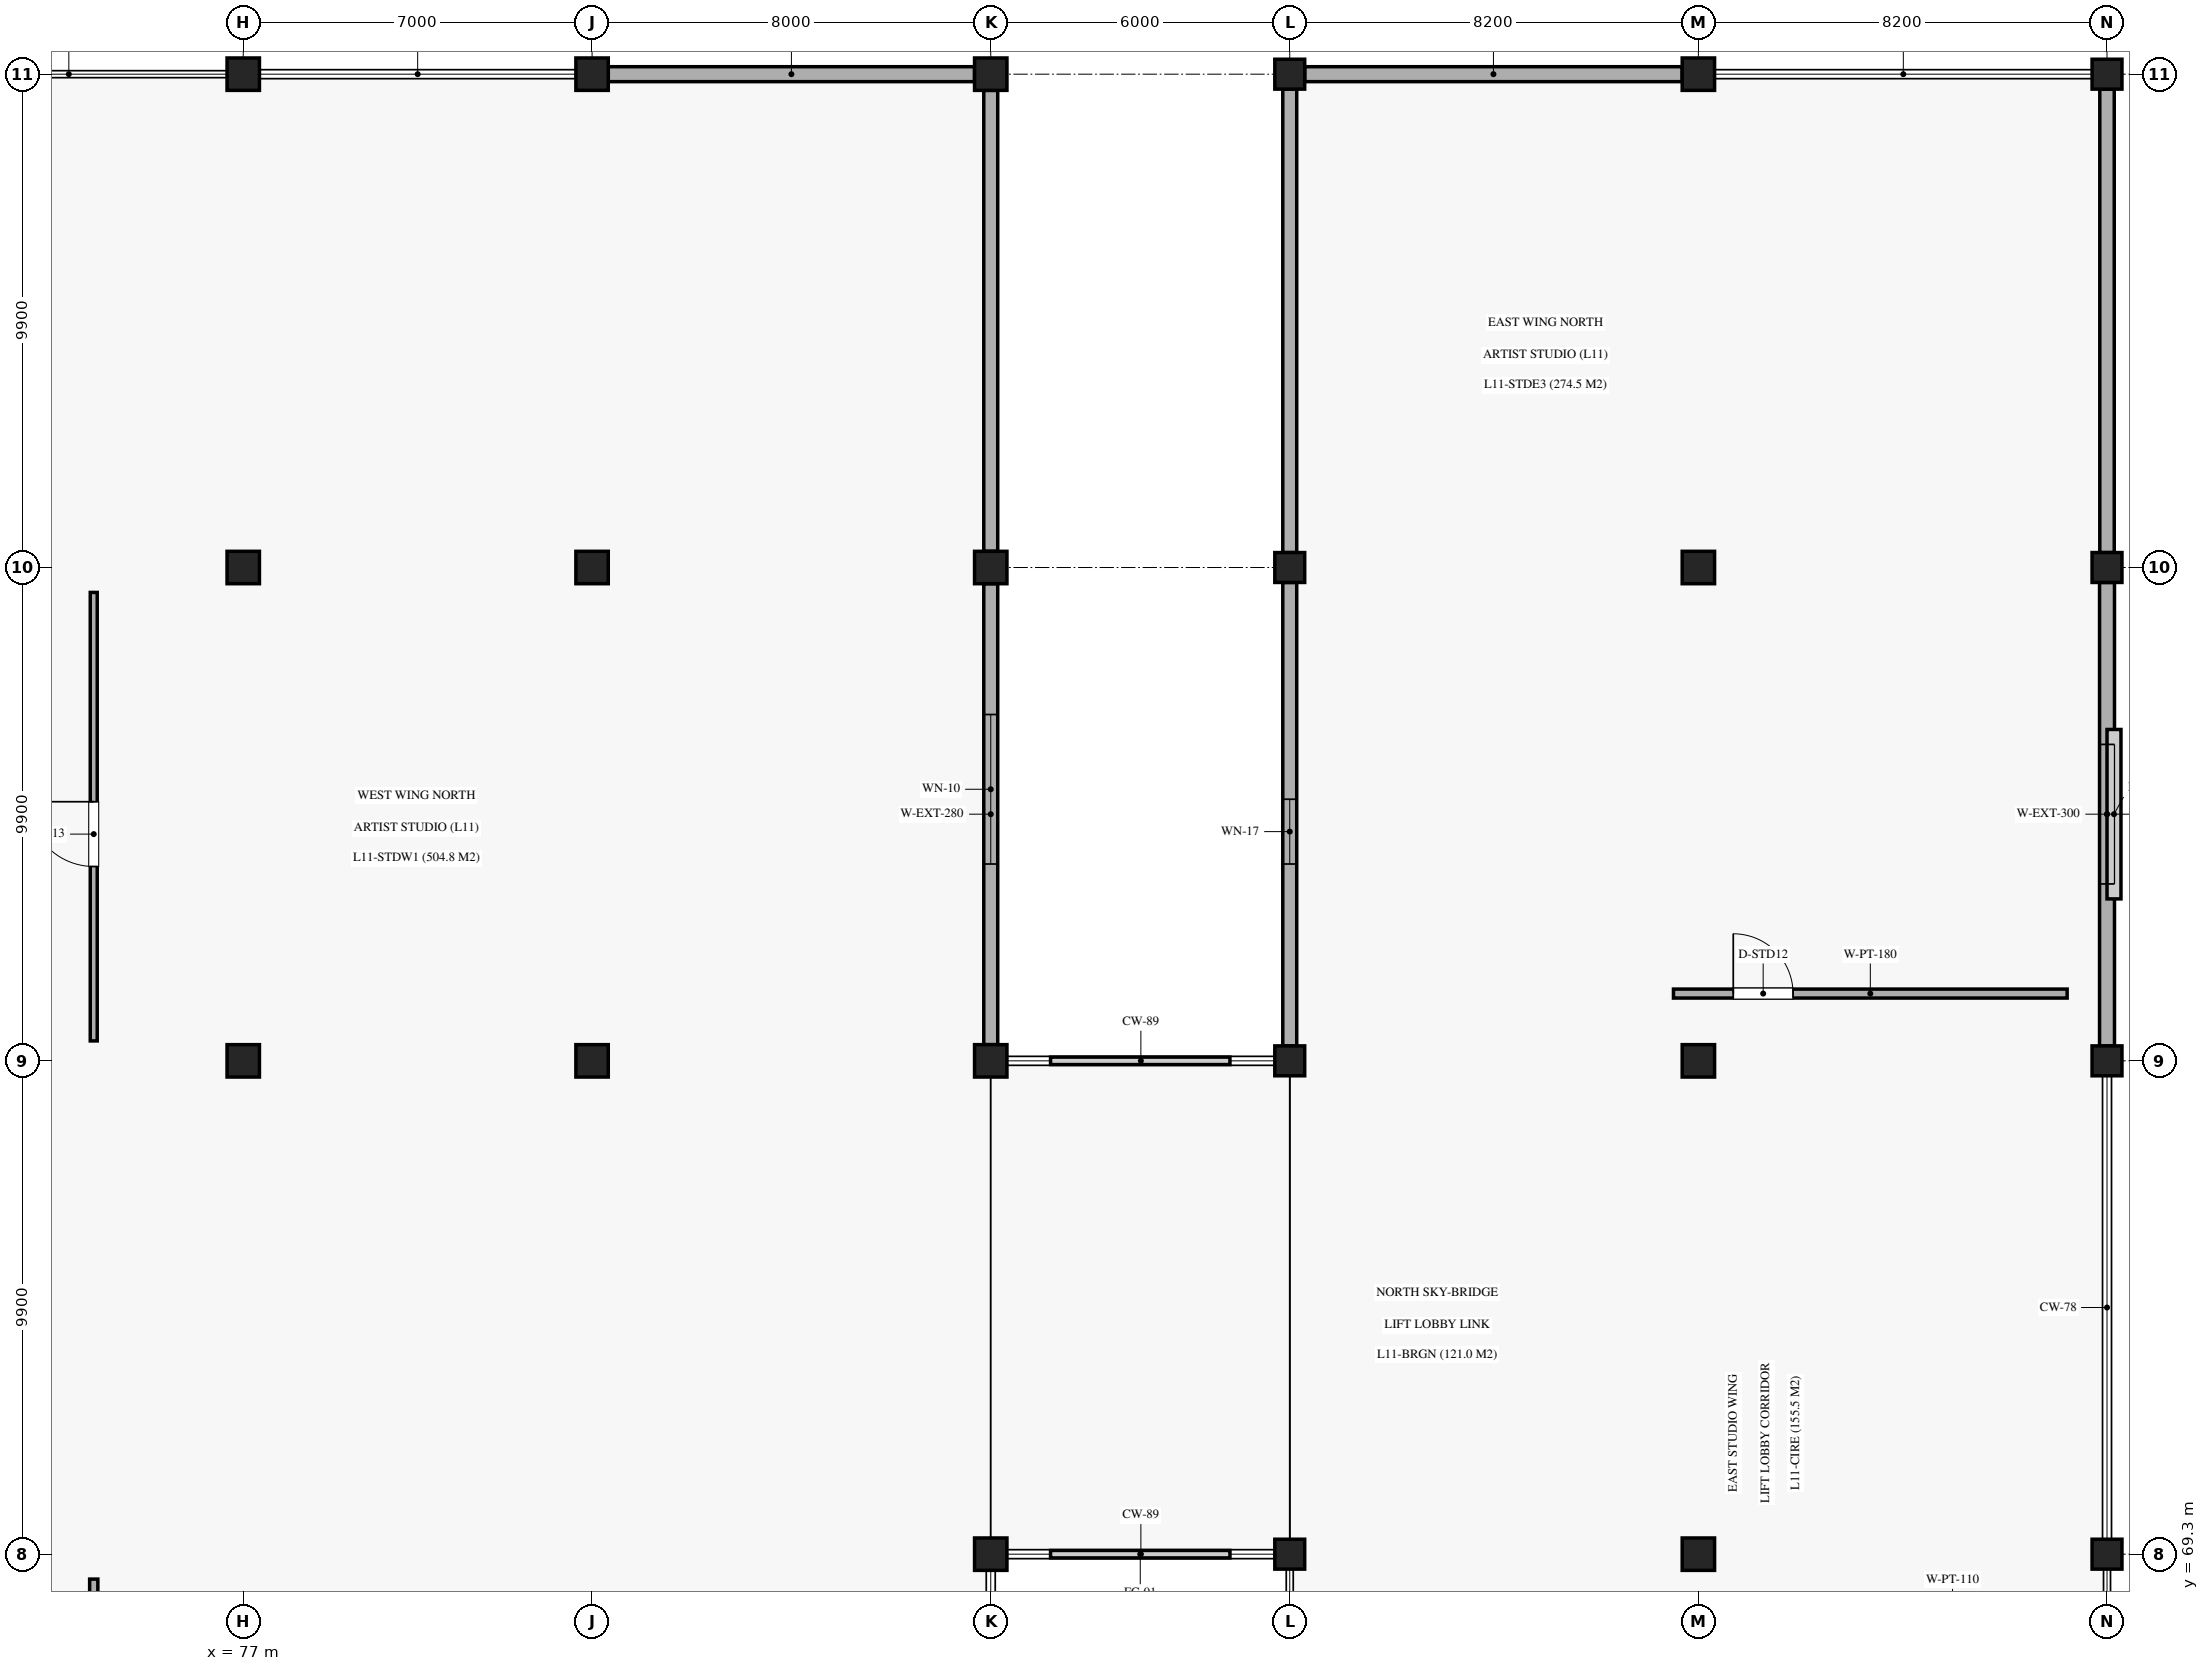
"""IFC4 building model, lengths in metres.
Left out: names, types, materials, properties, quantities, classifications, styles, units other than length and angle.
Written with IfcOpenShell. Run it as: python <this file> out.ifc"""

import sys

from ifc_helpers import new_model, si_unit, direction, frame, frame_2d, origin, origin_2d, place, context, subcontext, project, spatial, rectangle, extrude, element, fill, save


model = new_model("IFC4")
c1 = context("Model", 3, precision=1e-05, world=origin(), true_north=direction((0.0, 1.0)))
c2 = subcontext(c1, "Body", "Model", "MODEL_VIEW")
j1 = project(units=[si_unit("LENGTHUNIT", "METRE"), si_unit("PLANEANGLEUNIT", "RADIAN")], contexts=[c1])
p1 = place(None, origin())
s1 = spatial("IfcSite", under=j1, at=p1, CompositionType="ELEMENT")
p2 = place(p1, origin())
s2 = spatial("IfcBuilding", under=s1, at=p2, CompositionType="ELEMENT")
p3 = place(p2, frame((0.0, 0.0, 57.12)))
s3 = spatial("IfcBuildingStorey", under=s2, at=p3, CompositionType="ELEMENT", Elevation=57.12)
for number, where, z_axis, x_axis in (
    (1, (77.0, 79.2, 0.0), (0.0, 0.0, 1.0), (1.0, 0.0, 0.0)),
    (2, (77.0, 89.1, 0.0), (0.0, 0.0, 1.0), (1.0, 0.0, 0.0)),
    (3, (77.0, 99.0, 0.0), (0.0, 0.0, 1.0), (1.0, 0.0, 0.0)),
    (4, (84.0, 79.2, 0.0), (0.0, 0.0, 1.0), (1.0, 0.0, 0.0)),
    (5, (84.0, 89.1, 0.0), (0.0, 0.0, 1.0), (1.0, 0.0, 0.0)),
    (6, (84.0, 99.0, 0.0), (0.0, 0.0, 1.0), (1.0, 0.0, 0.0)),
    (7, (92.0, 69.3, 0.0), (0.0, 0.0, 1.0), (1.0, 0.0, 0.0)),
    (8, (92.0, 79.2, 0.0), (0.0, 0.0, 1.0), (1.0, 0.0, 0.0)),
    (9, (92.0, 89.1, 0.0), (0.0, 0.0, 1.0), (1.0, 0.0, 0.0)),
    (10, (92.0, 99.0, 0.0), (0.0, 0.0, 1.0), (1.0, 0.0, 0.0)),
):
    element("IfcColumn", number, at=place(p3, frame(where, z_axis=z_axis, x_axis=x_axis)), inside=s3, PredefinedType="COLUMN", context=c2, shape_type="SweptSolid", body=[
        extrude(rectangle(XDim=0.65, YDim=0.65, at=origin_2d()), origin(), (0.0, 0.0, 1.0), 5.1),
    ])
for number, where, z_axis, x_axis in (
    (11, (98.0, 69.3, 0.0), (0.0, 0.0, 1.0), (1.0, 0.0, 0.0)),
    (12, (98.0, 79.2, 0.0), (0.0, 0.0, 1.0), (1.0, 0.0, 0.0)),
    (13, (98.0, 89.1, 0.0), (0.0, 0.0, 1.0), (1.0, 0.0, 0.0)),
    (14, (98.0, 99.0, 0.0), (0.0, 0.0, 1.0), (1.0, 0.0, 0.0)),
):
    element("IfcColumn", number, at=place(p3, frame(where, z_axis=z_axis, x_axis=x_axis)), inside=s3, PredefinedType="COLUMN", context=c2, shape_type="SweptSolid", body=[
        extrude(rectangle(XDim=0.6, YDim=0.6, at=origin_2d()), origin(), (0.0, 0.0, 1.0), 5.1),
    ])
for number, where, z_axis, x_axis in (
    (15, (106.2, 69.3, 0.0), (0.0, 0.0, 1.0), (1.0, 0.0, 0.0)),
    (16, (106.2, 79.2, 0.0), (0.0, 0.0, 1.0), (1.0, 0.0, 0.0)),
    (17, (106.2, 89.1, 0.0), (0.0, 0.0, 1.0), (1.0, 0.0, 0.0)),
    (18, (106.2, 99.0, 0.0), (0.0, 0.0, 1.0), (1.0, 0.0, 0.0)),
):
    element("IfcColumn", number, at=place(p3, frame(where, z_axis=z_axis, x_axis=x_axis)), inside=s3, PredefinedType="COLUMN", context=c2, shape_type="SweptSolid", body=[
        extrude(rectangle(XDim=0.65, YDim=0.65, at=origin_2d()), origin(), (0.0, 0.0, 1.0), 5.1),
    ])
for number, where, z_axis, x_axis in (
    (19, (114.4, 69.3, 0.0), (0.0, 0.0, 1.0), (1.0, 0.0, 0.0)),
    (20, (114.4, 79.2, 0.0), (0.0, 0.0, 1.0), (1.0, 0.0, 0.0)),
    (21, (114.4, 89.1, 0.0), (0.0, 0.0, 1.0), (1.0, 0.0, 0.0)),
    (22, (114.4, 99.0, 0.0), (0.0, 0.0, 1.0), (1.0, 0.0, 0.0)),
):
    element("IfcColumn", number, at=place(p3, frame(where, z_axis=z_axis, x_axis=x_axis)), inside=s3, PredefinedType="COLUMN", context=c2, shape_type="SweptSolid", body=[
        extrude(rectangle(XDim=0.6, YDim=0.6, at=origin_2d()), origin(), (0.0, 0.0, 1.0), 5.1),
    ])
p4 = place(p3, frame((92.0, 79.525, 0.0), z_axis=(0.0, 0.0, 1.0), x_axis=(0.0, 1.0, 0.0)))
e23 = element("IfcWall", 23, at=p4, inside=s3, PredefinedType="SOLIDWALL", context=c2, shape_type="SweptSolid", body=[
    extrude(rectangle(XDim=9.25, YDim=0.28, at=frame_2d((4.625, 0.0))), origin(), (0.0, 0.0, 1.0), 4.12),
])
p5 = place(p4, frame((3.625, 0.0, 1.45)))
e24 = element("IfcOpeningElement", 24, at=p5, cuts=e23, PredefinedType="OPENING", context=c2, shape_type="SweptSolid", body=[
    extrude(rectangle(XDim=3.0, YDim=1.95, at=frame_2d((1.5, 0.975))), frame((0.0, 0.15, 0.0), z_axis=(0.0, -1.0, 0.0), x_axis=(1.0, 0.0, 0.0)), (0.0, 0.0, 1.0), 0.3),
])
p6 = place(p3, frame((92.0, 89.425, 0.0), z_axis=(0.0, 0.0, 1.0), x_axis=(0.0, 1.0, 0.0)))
e25 = element("IfcWall", 25, at=p6, inside=s3, PredefinedType="SOLIDWALL", context=c2, shape_type="SweptSolid", body=[
    extrude(rectangle(XDim=9.25, YDim=0.28, at=frame_2d((4.625, 0.0))), origin(), (0.0, 0.0, 1.0), 4.12),
])
p7 = place(p3, frame((84.325, 99.0, 0.0), z_axis=(0.0, 0.0, 1.0), x_axis=(1.0, 0.0, 0.0)))
e26 = element("IfcWall", 26, at=p7, inside=s3, PredefinedType="SOLIDWALL", context=c2, shape_type="SweptSolid", body=[
    extrude(rectangle(XDim=7.35, YDim=0.3, at=frame_2d((3.675, 0.0))), origin(), (0.0, 0.0, 1.0), 4.12),
])
p8 = place(p3, frame((98.0, 79.5, 0.0), z_axis=(0.0, 0.0, 1.0), x_axis=(0.0, 1.0, 0.0)))
e27 = element("IfcWall", 27, at=p8, inside=s3, PredefinedType="SOLIDWALL", context=c2, shape_type="SweptSolid", body=[
    extrude(rectangle(XDim=9.3, YDim=0.28, at=frame_2d((4.65, 0.0))), origin(), (0.0, 0.0, 1.0), 4.12),
])
p9 = place(p8, frame((3.65, 0.0, 1.45)))
e28 = element("IfcOpeningElement", 28, at=p9, cuts=e27, PredefinedType="OPENING", context=c2, shape_type="SweptSolid", body=[
    extrude(rectangle(XDim=1.3, YDim=1.3, at=frame_2d((0.65, 0.65))), frame((0.0, 0.15, 0.0), z_axis=(0.0, -1.0, 0.0), x_axis=(1.0, 0.0, 0.0)), (0.0, 0.0, 1.0), 0.3),
])
p10 = place(p3, frame((114.4, 79.5, 0.0), z_axis=(0.0, 0.0, 1.0), x_axis=(0.0, 1.0, 0.0)))
e29 = element("IfcWall", 29, at=p10, inside=s3, PredefinedType="SOLIDWALL", context=c2, shape_type="SweptSolid", body=[
    extrude(rectangle(XDim=9.3, YDim=0.3, at=frame_2d((4.65, 0.0))), origin(), (0.0, 0.0, 1.0), 4.12),
])
p11 = place(p10, frame((3.25, 0.0, 1.65)))
e30 = element("IfcOpeningElement", 30, at=p11, cuts=e29, PredefinedType="OPENING", context=c2, shape_type="SweptSolid", body=[
    extrude(rectangle(XDim=2.8, YDim=1.9, at=frame_2d((1.4, 0.95))), frame((0.0, 0.16, 0.0), z_axis=(0.0, -1.0, 0.0), x_axis=(1.0, 0.0, 0.0)), (0.0, 0.0, 1.0), 0.32),
])
p12 = place(p3, frame((98.0, 89.4, 0.0), z_axis=(0.0, 0.0, 1.0), x_axis=(0.0, 1.0, 0.0)))
e31 = element("IfcWall", 31, at=p12, inside=s3, PredefinedType="SOLIDWALL", context=c2, shape_type="SweptSolid", body=[
    extrude(rectangle(XDim=9.3, YDim=0.28, at=frame_2d((4.65, 0.0))), origin(), (0.0, 0.0, 1.0), 4.12),
])
p13 = place(p3, frame((114.4, 89.4, 0.0), z_axis=(0.0, 0.0, 1.0), x_axis=(0.0, 1.0, 0.0)))
e32 = element("IfcWall", 32, at=p13, inside=s3, PredefinedType="SOLIDWALL", context=c2, shape_type="SweptSolid", body=[
    extrude(rectangle(XDim=9.3, YDim=0.29, at=frame_2d((4.65, 0.0))), origin(), (0.0, 0.0, 1.0), 4.12),
])
p14 = place(p3, frame((98.3, 99.0, 0.0), z_axis=(0.0, 0.0, 1.0), x_axis=(1.0, 0.0, 0.0)))
e33 = element("IfcWall", 33, at=p14, inside=s3, PredefinedType="SOLIDWALL", context=c2, shape_type="SweptSolid", body=[
    extrude(rectangle(XDim=7.575, YDim=0.3, at=frame_2d((3.788, 0.0))), origin(), (0.0, 0.0, 1.0), 4.12),
])
p15 = place(p3, frame((74.0, 48.5, 0.0), z_axis=(0.0, 0.0, 1.0), x_axis=(0.0, 1.0, 0.0)))
e34 = element("IfcWall", 34, at=p15, inside=s3, PredefinedType="PARTITIONING", context=c2, shape_type="SweptSolid", body=[
    extrude(rectangle(XDim=20.3, YDim=0.165, at=frame_2d((10.15, 0.0))), origin(), (0.0, 0.0, 1.0), 3.99),
])
p16 = place(p15, frame((2.5, 0.0, 0.0)))
e35 = element("IfcOpeningElement", 35, at=p16, cuts=e34, PredefinedType="OPENING", context=c2, shape_type="SweptSolid", body=[
    extrude(rectangle(XDim=1.8, YDim=2.45, at=frame_2d((0.9, 1.225))), frame((0.0, 0.093, 0.0), z_axis=(0.0, -1.0, 0.0), x_axis=(1.0, 0.0, 0.0)), (0.0, 0.0, 1.0), 0.185),
])
p17 = place(p3, frame((74.0, 79.6, 0.0), z_axis=(0.0, 0.0, 1.0), x_axis=(0.0, 1.0, 0.0)))
e36 = element("IfcWall", 36, at=p17, inside=s3, PredefinedType="PARTITIONING", context=c2, shape_type="SweptSolid", body=[
    extrude(rectangle(XDim=9.0, YDim=0.14, at=frame_2d((4.5, 0.0))), origin(), (0.0, 0.0, 1.0), 3.99),
])
p18 = place(p17, frame((3.5, 0.0, 0.0)))
e37 = element("IfcOpeningElement", 37, at=p18, cuts=e36, PredefinedType="OPENING", context=c2, shape_type="SweptSolid", body=[
    extrude(rectangle(XDim=1.3, YDim=2.25, at=frame_2d((0.65, 1.125))), frame((0.0, 0.08, 0.0), z_axis=(0.0, -1.0, 0.0), x_axis=(1.0, 0.0, 0.0)), (0.0, 0.0, 1.0), 0.16),
])
p19 = place(p3, frame((105.7, 80.55, 0.0), z_axis=(0.0, 0.0, 1.0), x_axis=(1.0, 0.0, 0.0)))
e38 = element("IfcWall", 38, at=p19, inside=s3, PredefinedType="PARTITIONING", context=c2, shape_type="SweptSolid", body=[
    extrude(rectangle(XDim=7.9, YDim=0.18, at=frame_2d((3.95, 0.0))), origin(), (0.0, 0.0, 1.0), 3.99),
])
p20 = place(p19, frame((1.2, 0.0, 0.0)))
e39 = element("IfcOpeningElement", 39, at=p20, cuts=e38, PredefinedType="OPENING", context=c2, shape_type="SweptSolid", body=[
    extrude(rectangle(XDim=1.2, YDim=2.25, at=frame_2d((0.6, 1.125))), frame((0.0, 0.1, 0.0), z_axis=(0.0, -1.0, 0.0), x_axis=(1.0, 0.0, 0.0)), (0.0, 0.0, 1.0), 0.2),
])
p21 = place(p5, origin())
e40 = element("IfcWindow", 40, at=p21, inside=s3, PartitioningType="SINGLE_PANEL", PredefinedType="WINDOW", context=c2, shape_type="SweptSolid", body=[
    extrude(rectangle(XDim=3.0, YDim=1.95, at=frame_2d((1.5, 0.975))), frame((0.0, 0.03, 0.0), z_axis=(0.0, -1.0, 0.0), x_axis=(1.0, 0.0, 0.0)), (0.0, 0.0, 1.0), 0.06),
])
fill(e24, e40)
p22 = place(p9, origin())
e41 = element("IfcWindow", 41, at=p22, inside=s3, PartitioningType="SINGLE_PANEL", PredefinedType="WINDOW", context=c2, shape_type="SweptSolid", body=[
    extrude(rectangle(XDim=1.3, YDim=1.3, at=frame_2d((0.65, 0.65))), frame((0.0, 0.03, 0.0), z_axis=(0.0, -1.0, 0.0), x_axis=(1.0, 0.0, 0.0)), (0.0, 0.0, 1.0), 0.06),
])
fill(e28, e41)
p23 = place(p11, origin())
e42 = element("IfcWindow", 42, at=p23, inside=s3, PartitioningType="SINGLE_PANEL", PredefinedType="WINDOW", context=c2, shape_type="SweptSolid", body=[
    extrude(rectangle(XDim=2.8, YDim=1.9, at=frame_2d((1.4, 0.95))), frame((0.0, 0.03, 0.0), z_axis=(0.0, -1.0, 0.0), x_axis=(1.0, 0.0, 0.0)), (0.0, 0.0, 1.0), 0.06),
])
fill(e30, e42)
p24 = place(p18, origin())
e43 = element("IfcDoor", 43, at=p24, inside=s3, OperationType="SINGLE_SWING_RIGHT", PredefinedType="DOOR", context=c2, shape_type="SweptSolid", body=[
    extrude(rectangle(XDim=1.3, YDim=2.25, at=frame_2d((0.65, 1.125))), frame((0.0, 0.025, 0.0), z_axis=(0.0, -1.0, 0.0), x_axis=(1.0, 0.0, 0.0)), (0.0, 0.0, 1.0), 0.05),
])
fill(e37, e43)
p25 = place(p20, origin())
e44 = element("IfcDoor", 44, at=p25, inside=s3, OperationType="SINGLE_SWING_LEFT", PredefinedType="DOOR", context=c2, shape_type="SweptSolid", body=[
    extrude(rectangle(XDim=1.2, YDim=2.25, at=frame_2d((0.6, 1.125))), frame((0.0, 0.025, 0.0), z_axis=(0.0, -1.0, 0.0), x_axis=(1.0, 0.0, 0.0)), (0.0, 0.0, 1.0), 0.05),
])
fill(e39, e44)
save(model, sys.argv[1])
